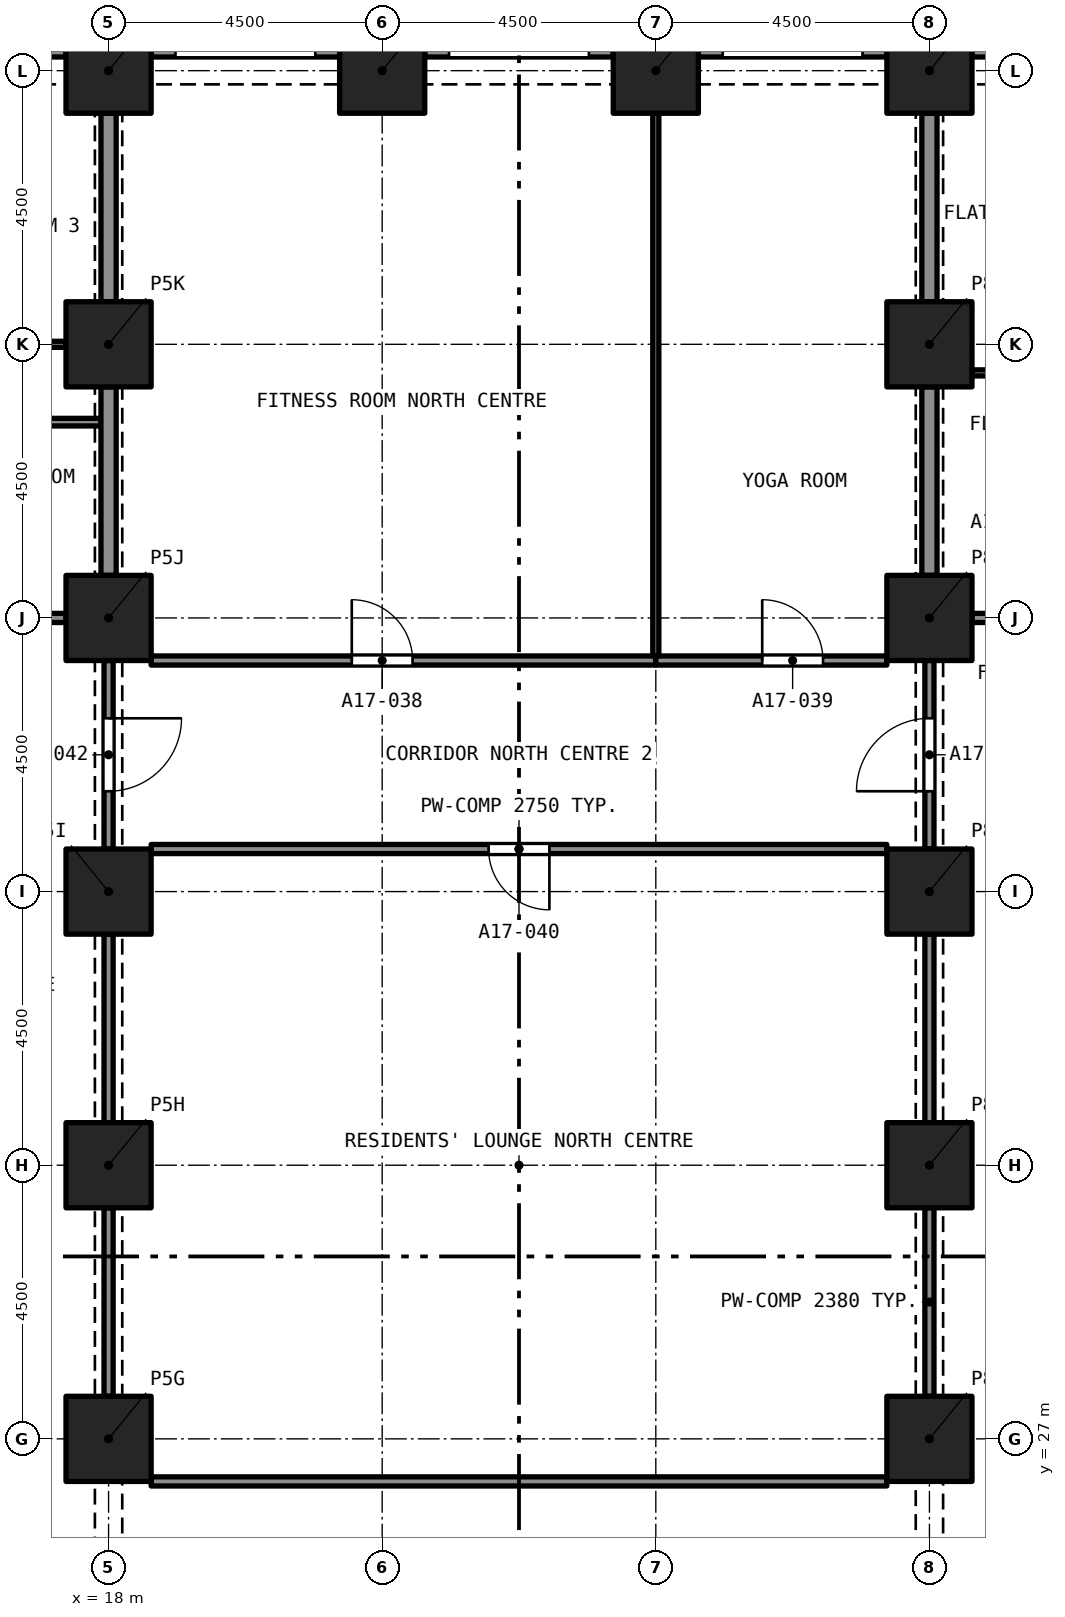
"""IFC4 building model, lengths in metres.
Left out: names, types, materials, properties, quantities, classifications, styles, units other than length and angle.
Written with IfcOpenShell. Run it as: python <this file> out.ifc"""

import sys

from ifc_helpers import new_model, si_unit, direction, frame, frame_2d, origin, origin_2d, place, context, subcontext, project, spatial, rectangle, extrude, element, fill, save


model = new_model("IFC4")
c1 = context("Model", 3, precision=1e-05, world=origin(), true_north=direction((0.0, 1.0)))
c2 = subcontext(c1, "Body", "Model", "MODEL_VIEW")
j1 = project(units=[si_unit("LENGTHUNIT", "METRE"), si_unit("PLANEANGLEUNIT", "RADIAN")], contexts=[c1])
p1 = place(None, origin())
s1 = spatial("IfcSite", under=j1, at=p1, CompositionType="ELEMENT")
p2 = place(p1, origin())
s2 = spatial("IfcBuilding", under=s1, at=p2, CompositionType="ELEMENT")
p3 = place(p2, frame((0.0, 0.0, 65.6)))
s3 = spatial("IfcBuildingStorey", under=s2, at=p3, CompositionType="ELEMENT", Elevation=65.6)
for number, where, z_axis, x_axis in (
    (1, (18.0, 27.0, 0.0), (0.0, 0.0, 1.0), (1.0, 0.0, 0.0)),
    (2, (31.5, 27.0, 0.0), (0.0, 0.0, 1.0), (1.0, 0.0, 0.0)),
    (3, (18.0, 31.5, 0.0), (0.0, 0.0, 1.0), (1.0, 0.0, 0.0)),
    (4, (31.5, 31.5, 0.0), (0.0, 0.0, 1.0), (1.0, 0.0, 0.0)),
    (5, (18.0, 36.0, 0.0), (0.0, 0.0, 1.0), (1.0, 0.0, 0.0)),
    (6, (31.5, 36.0, 0.0), (0.0, 0.0, 1.0), (1.0, 0.0, 0.0)),
    (7, (18.0, 40.5, 0.0), (0.0, 0.0, 1.0), (1.0, 0.0, 0.0)),
    (8, (31.5, 40.5, 0.0), (0.0, 0.0, 1.0), (1.0, 0.0, 0.0)),
    (9, (18.0, 45.0, 0.0), (0.0, 0.0, 1.0), (1.0, 0.0, 0.0)),
    (10, (31.5, 45.0, 0.0), (0.0, 0.0, 1.0), (1.0, 0.0, 0.0)),
    (11, (18.0, 49.5, 0.0), (0.0, 0.0, 1.0), (1.0, 0.0, 0.0)),
    (12, (22.5, 49.5, 0.0), (0.0, 0.0, 1.0), (1.0, 0.0, 0.0)),
    (13, (27.0, 49.5, 0.0), (0.0, 0.0, 1.0), (1.0, 0.0, 0.0)),
    (14, (31.5, 49.5, 0.0), (0.0, 0.0, 1.0), (1.0, 0.0, 0.0)),
):
    element("IfcColumn", number, at=place(p3, frame(where, z_axis=z_axis, x_axis=x_axis)), inside=s3, PredefinedType="COLUMN", context=c2, shape_type="SweptSolid", body=[
        extrude(rectangle(XDim=1.4, YDim=1.4, at=origin_2d()), origin(), (0.0, 0.0, 1.0), 3.2),
    ])
p4 = place(p3, frame((32.2, 49.875, 0.0), z_axis=(0.0, 0.0, 1.0), x_axis=(1.0, 0.0, 0.0)))
e15 = element("IfcWall", 15, at=p4, inside=s3, PredefinedType="SOLIDWALL", context=c2, shape_type="SweptSolid", body=[
    extrude(rectangle(XDim=3.1, YDim=0.3, at=frame_2d((1.55, 0.0))), origin(), (0.0, 0.0, 1.0), 3.2),
])
p5 = place(p4, frame((0.4, 0.0, 0.45)))
e16 = element("IfcOpeningElement", 16, at=p5, cuts=e15, PredefinedType="OPENING", context=c2, shape_type="SweptSolid", body=[
    extrude(rectangle(XDim=2.3, YDim=1.95, at=frame_2d((1.15, 0.975))), frame((0.0, 0.16, 0.0), z_axis=(0.0, -1.0, 0.0), x_axis=(1.0, 0.0, 0.0)), (0.0, 0.0, 1.0), 0.32),
])
p6 = place(p3, frame((27.7, 49.875, 0.0), z_axis=(0.0, 0.0, 1.0), x_axis=(1.0, 0.0, 0.0)))
e17 = element("IfcWall", 17, at=p6, inside=s3, PredefinedType="SOLIDWALL", context=c2, shape_type="SweptSolid", body=[
    extrude(rectangle(XDim=3.1, YDim=0.3, at=frame_2d((1.55, 0.0))), origin(), (0.0, 0.0, 1.0), 3.2),
])
p7 = place(p6, frame((0.4, 0.0, 0.45)))
e18 = element("IfcOpeningElement", 18, at=p7, cuts=e17, PredefinedType="OPENING", context=c2, shape_type="SweptSolid", body=[
    extrude(rectangle(XDim=2.3, YDim=1.95, at=frame_2d((1.15, 0.975))), frame((0.0, 0.16, 0.0), z_axis=(0.0, -1.0, 0.0), x_axis=(1.0, 0.0, 0.0)), (0.0, 0.0, 1.0), 0.32),
])
p8 = place(p3, frame((23.2, 49.875, 0.0), z_axis=(0.0, 0.0, 1.0), x_axis=(1.0, 0.0, 0.0)))
e19 = element("IfcWall", 19, at=p8, inside=s3, PredefinedType="SOLIDWALL", context=c2, shape_type="SweptSolid", body=[
    extrude(rectangle(XDim=3.1, YDim=0.3, at=frame_2d((1.55, 0.0))), origin(), (0.0, 0.0, 1.0), 3.2),
])
p9 = place(p8, frame((0.4, 0.0, 0.45)))
e20 = element("IfcOpeningElement", 20, at=p9, cuts=e19, PredefinedType="OPENING", context=c2, shape_type="SweptSolid", body=[
    extrude(rectangle(XDim=2.3, YDim=1.95, at=frame_2d((1.15, 0.975))), frame((0.0, 0.16, 0.0), z_axis=(0.0, -1.0, 0.0), x_axis=(1.0, 0.0, 0.0)), (0.0, 0.0, 1.0), 0.32),
])
p10 = place(p3, frame((18.7, 49.875, 0.0), z_axis=(0.0, 0.0, 1.0), x_axis=(1.0, 0.0, 0.0)))
e21 = element("IfcWall", 21, at=p10, inside=s3, PredefinedType="SOLIDWALL", context=c2, shape_type="SweptSolid", body=[
    extrude(rectangle(XDim=3.1, YDim=0.3, at=frame_2d((1.55, 0.0))), origin(), (0.0, 0.0, 1.0), 3.2),
])
p11 = place(p10, frame((0.4, 0.0, 0.45)))
e22 = element("IfcOpeningElement", 22, at=p11, cuts=e21, PredefinedType="OPENING", context=c2, shape_type="SweptSolid", body=[
    extrude(rectangle(XDim=2.3, YDim=1.95, at=frame_2d((1.15, 0.975))), frame((0.0, 0.16, 0.0), z_axis=(0.0, -1.0, 0.0), x_axis=(1.0, 0.0, 0.0)), (0.0, 0.0, 1.0), 0.32),
])
p12 = place(p3, frame((14.2, 49.875, 0.0), z_axis=(0.0, 0.0, 1.0), x_axis=(1.0, 0.0, 0.0)))
e23 = element("IfcWall", 23, at=p12, inside=s3, PredefinedType="SOLIDWALL", context=c2, shape_type="SweptSolid", body=[
    extrude(rectangle(XDim=3.1, YDim=0.3, at=frame_2d((1.55, 0.0))), origin(), (0.0, 0.0, 1.0), 3.2),
])
p13 = place(p12, frame((0.4, 0.0, 0.45)))
e24 = element("IfcOpeningElement", 24, at=p13, cuts=e23, PredefinedType="OPENING", context=c2, shape_type="SweptSolid", body=[
    extrude(rectangle(XDim=2.3, YDim=1.95, at=frame_2d((1.15, 0.975))), frame((0.0, 0.16, 0.0), z_axis=(0.0, -1.0, 0.0), x_axis=(1.0, 0.0, 0.0)), (0.0, 0.0, 1.0), 0.32),
])
p14 = place(p3, frame((17.875, 43.72, 0.0), z_axis=(0.0, 0.0, 1.0), x_axis=(-1.0, 0.0, 0.0)))
e25 = element("IfcWall", 25, at=p14, inside=s3, PredefinedType="PARTITIONING", context=c2, shape_type="SweptSolid", body=[
    extrude(rectangle(XDim=4.357, YDim=0.125, at=frame_2d((2.178, 0.0))), origin(), (0.0, 0.0, 1.0), 2.9),
])
p15 = place(p14, frame((1.716, 0.0, 0.0)))
e26 = element("IfcOpeningElement", 26, at=p15, cuts=e25, PredefinedType="OPENING", context=c2, shape_type="SweptSolid", body=[
    extrude(rectangle(XDim=0.8, YDim=2.1, at=frame_2d((0.4, 1.05))), frame((0.0, 0.073, 0.0), z_axis=(0.0, -1.0, 0.0), x_axis=(1.0, 0.0, 0.0)), (0.0, 0.0, 1.0), 0.145),
])
p16 = place(p3, frame((18.0, 41.2, 0.0), z_axis=(0.0, 0.0, 1.0), x_axis=(0.0, 1.0, 0.0)))
e27 = element("IfcWall", 27, at=p16, inside=s3, PredefinedType="PARTITIONING", context=c2, shape_type="SweptSolid", body=[
    extrude(rectangle(XDim=3.1, YDim=0.25, at=frame_2d((1.55, 0.0))), origin(), (0.0, 0.0, 1.0), 2.38),
])
p17 = place(p3, frame((13.456, 40.5, 0.0), z_axis=(0.0, 0.0, 1.0), x_axis=(1.0, 0.0, 0.0)))
e28 = element("IfcWall", 28, at=p17, inside=s3, PredefinedType="PARTITIONING", context=c2, shape_type="SweptSolid", body=[
    extrude(rectangle(XDim=3.844, YDim=0.15, at=frame_2d((1.922, 0.0))), origin(), (0.0, 0.0, 1.0), 2.9),
])
p18 = place(p3, frame((13.5, 45.0, 0.0), z_axis=(0.0, 0.0, 1.0), x_axis=(1.0, 0.0, 0.0)))
e29 = element("IfcWall", 29, at=p18, inside=s3, PredefinedType="PARTITIONING", context=c2, shape_type="SweptSolid", body=[
    extrude(rectangle(XDim=3.8, YDim=0.1, at=frame_2d((1.9, 0.0))), origin(), (0.0, 0.0, 1.0), 2.9),
])
p19 = place(p18, frame((1.8, 0.0, 0.0)))
e30 = element("IfcOpeningElement", 30, at=p19, cuts=e29, PredefinedType="OPENING", context=c2, shape_type="SweptSolid", body=[
    extrude(rectangle(XDim=0.9, YDim=2.1, at=frame_2d((0.45, 1.05))), frame((0.0, 0.06, 0.0), z_axis=(0.0, -1.0, 0.0), x_axis=(1.0, 0.0, 0.0)), (0.0, 0.0, 1.0), 0.12),
])
p20 = place(p3, frame((18.0, 45.7, 0.0), z_axis=(0.0, 0.0, 1.0), x_axis=(0.0, 1.0, 0.0)))
e31 = element("IfcWall", 31, at=p20, inside=s3, PredefinedType="PARTITIONING", context=c2, shape_type="SweptSolid", body=[
    extrude(rectangle(XDim=3.1, YDim=0.25, at=frame_2d((1.55, 0.0))), origin(), (0.0, 0.0, 1.0), 2.38),
])
p21 = place(p3, frame((32.2, 44.53, 0.0), z_axis=(0.0, 0.0, 1.0), x_axis=(1.0, 0.0, 0.0)))
e32 = element("IfcWall", 32, at=p21, inside=s3, PredefinedType="PARTITIONING", context=c2, shape_type="SweptSolid", body=[
    extrude(rectangle(XDim=3.8, YDim=0.1, at=frame_2d((1.9, 0.0))), origin(), (0.0, 0.0, 1.0), 2.9),
])
p22 = place(p21, frame((1.05, 0.0, 0.0)))
e33 = element("IfcOpeningElement", 33, at=p22, cuts=e32, PredefinedType="OPENING", context=c2, shape_type="SweptSolid", body=[
    extrude(rectangle(XDim=1.0, YDim=2.1, at=frame_2d((0.5, 1.05))), frame((0.0, 0.06, 0.0), z_axis=(0.0, -1.0, 0.0), x_axis=(1.0, 0.0, 0.0)), (0.0, 0.0, 1.0), 0.12),
])
p23 = place(p3, frame((31.5, 41.2, 0.0), z_axis=(0.0, 0.0, 1.0), x_axis=(0.0, 1.0, 0.0)))
e34 = element("IfcWall", 34, at=p23, inside=s3, PredefinedType="PARTITIONING", context=c2, shape_type="SweptSolid", body=[
    extrude(rectangle(XDim=3.1, YDim=0.25, at=frame_2d((1.55, 0.0))), origin(), (0.0, 0.0, 1.0), 2.38),
])
p24 = place(p3, frame((32.2, 40.5, 0.0), z_axis=(0.0, 0.0, 1.0), x_axis=(1.0, 0.0, 0.0)))
e35 = element("IfcWall", 35, at=p24, inside=s3, PredefinedType="PARTITIONING", context=c2, shape_type="SweptSolid", body=[
    extrude(rectangle(XDim=2.225, YDim=0.15, at=frame_2d((1.113, 0.0))), origin(), (0.0, 0.0, 1.0), 2.9),
])
p25 = place(p24, frame((1.05, 0.0, 0.0)))
e36 = element("IfcOpeningElement", 36, at=p25, cuts=e35, PredefinedType="OPENING", context=c2, shape_type="SweptSolid", body=[
    extrude(rectangle(XDim=1.0, YDim=2.1, at=frame_2d((0.5, 1.05))), frame((0.0, 0.085, 0.0), z_axis=(0.0, -1.0, 0.0), x_axis=(1.0, 0.0, 0.0)), (0.0, 0.0, 1.0), 0.17),
])
p26 = place(p3, frame((31.5, 45.7, 0.0), z_axis=(0.0, 0.0, 1.0), x_axis=(0.0, 1.0, 0.0)))
e37 = element("IfcWall", 37, at=p26, inside=s3, PredefinedType="PARTITIONING", context=c2, shape_type="SweptSolid", body=[
    extrude(rectangle(XDim=3.1, YDim=0.25, at=frame_2d((1.55, 0.0))), origin(), (0.0, 0.0, 1.0), 2.38),
])
p27 = place(p3, frame((18.7, 39.8, 0.0), z_axis=(0.0, 0.0, 1.0), x_axis=(1.0, 0.0, 0.0)))
e38 = element("IfcWall", 38, at=p27, inside=s3, PredefinedType="PARTITIONING", context=c2, shape_type="SweptSolid", body=[
    extrude(rectangle(XDim=8.3, YDim=0.15, at=frame_2d((4.15, 0.0))), origin(), (0.0, 0.0, 1.0), 2.75),
])
p28 = place(p27, frame((3.3, 0.0, 0.0)))
e39 = element("IfcOpeningElement", 39, at=p28, cuts=e38, PredefinedType="OPENING", context=c2, shape_type="SweptSolid", body=[
    extrude(rectangle(XDim=1.0, YDim=2.1, at=frame_2d((0.5, 1.05))), frame((0.0, 0.085, 0.0), z_axis=(0.0, -1.0, 0.0), x_axis=(1.0, 0.0, 0.0)), (0.0, 0.0, 1.0), 0.17),
])
p29 = place(p3, frame((27.0, 39.8, 0.0), z_axis=(0.0, 0.0, 1.0), x_axis=(1.0, 0.0, 0.0)))
e40 = element("IfcWall", 40, at=p29, inside=s3, PredefinedType="PARTITIONING", context=c2, shape_type="SweptSolid", body=[
    extrude(rectangle(XDim=3.8, YDim=0.15, at=frame_2d((1.9, 0.0))), origin(), (0.0, 0.0, 1.0), 2.75),
])
p30 = place(p29, frame((1.75, 0.0, 0.0)))
e41 = element("IfcOpeningElement", 41, at=p30, cuts=e40, PredefinedType="OPENING", context=c2, shape_type="SweptSolid", body=[
    extrude(rectangle(XDim=1.0, YDim=2.1, at=frame_2d((0.5, 1.05))), frame((0.0, 0.085, 0.0), z_axis=(0.0, -1.0, 0.0), x_axis=(1.0, 0.0, 0.0)), (0.0, 0.0, 1.0), 0.17),
])
p31 = place(p3, frame((30.8, 36.7, 0.0), z_axis=(0.0, 0.0, 1.0), x_axis=(-1.0, 0.0, 0.0)))
e42 = element("IfcWall", 42, at=p31, inside=s3, PredefinedType="PARTITIONING", context=c2, shape_type="SweptSolid", body=[
    extrude(rectangle(XDim=12.1, YDim=0.15, at=frame_2d((6.05, 0.0))), origin(), (0.0, 0.0, 1.0), 2.75),
])
p32 = place(p31, frame((5.55, 0.0, 0.0)))
e43 = element("IfcOpeningElement", 43, at=p32, cuts=e42, PredefinedType="OPENING", context=c2, shape_type="SweptSolid", body=[
    extrude(rectangle(XDim=1.0, YDim=2.1, at=frame_2d((0.5, 1.05))), frame((0.0, 0.085, 0.0), z_axis=(0.0, -1.0, 0.0), x_axis=(1.0, 0.0, 0.0)), (0.0, 0.0, 1.0), 0.17),
])
p33 = place(p3, frame((31.5, 36.7, 0.0), z_axis=(0.0, 0.0, 1.0), x_axis=(0.0, 1.0, 0.0)))
e44 = element("IfcWall", 44, at=p33, inside=s3, PredefinedType="PARTITIONING", context=c2, shape_type="SweptSolid", body=[
    extrude(rectangle(XDim=3.1, YDim=0.15, at=frame_2d((1.55, 0.0))), origin(), (0.0, 0.0, 1.0), 2.38),
])
p34 = place(p33, frame((0.95, 0.0, 0.0)))
e45 = element("IfcOpeningElement", 45, at=p34, cuts=e44, PredefinedType="OPENING", context=c2, shape_type="SweptSolid", body=[
    extrude(rectangle(XDim=1.2, YDim=2.1, at=frame_2d((0.6, 1.05))), frame((0.0, 0.085, 0.0), z_axis=(0.0, -1.0, 0.0), x_axis=(1.0, 0.0, 0.0)), (0.0, 0.0, 1.0), 0.17),
])
p35 = place(p3, frame((18.0, 39.8, 0.0), z_axis=(0.0, 0.0, 1.0), x_axis=(0.0, -1.0, 0.0)))
e46 = element("IfcWall", 46, at=p35, inside=s3, PredefinedType="PARTITIONING", context=c2, shape_type="SweptSolid", body=[
    extrude(rectangle(XDim=3.1, YDim=0.15, at=frame_2d((1.55, 0.0))), origin(), (0.0, 0.0, 1.0), 2.38),
])
p36 = place(p35, frame((0.95, 0.0, 0.0)))
e47 = element("IfcOpeningElement", 47, at=p36, cuts=e46, PredefinedType="OPENING", context=c2, shape_type="SweptSolid", body=[
    extrude(rectangle(XDim=1.2, YDim=2.1, at=frame_2d((0.6, 1.05))), frame((0.0, 0.085, 0.0), z_axis=(0.0, -1.0, 0.0), x_axis=(1.0, 0.0, 0.0)), (0.0, 0.0, 1.0), 0.17),
])
p37 = place(p3, frame((27.0, 39.875, 0.0), z_axis=(0.0, 0.0, 1.0), x_axis=(0.0, 1.0, 0.0)))
e48 = element("IfcWall", 48, at=p37, inside=s3, PredefinedType="PARTITIONING", context=c2, shape_type="SweptSolid", body=[
    extrude(rectangle(XDim=8.925, YDim=0.1, at=frame_2d((4.462, 0.0))), origin(), (0.0, 0.0, 1.0), 2.75),
])
for number, where, z_axis, x_axis in (
    (49, (31.5, 32.2, 0.0), (0.0, 0.0, 1.0), (0.0, 1.0, 0.0)),
    (50, (31.5, 27.7, 0.0), (0.0, 0.0, 1.0), (0.0, 1.0, 0.0)),
    (51, (18.0, 27.7, 0.0), (0.0, 0.0, 1.0), (0.0, 1.0, 0.0)),
    (52, (18.0, 32.2, 0.0), (0.0, 0.0, 1.0), (0.0, 1.0, 0.0)),
):
    element("IfcWall", number, at=place(p3, frame(where, z_axis=z_axis, x_axis=x_axis)), inside=s3, PredefinedType="PARTITIONING", context=c2, shape_type="SweptSolid", body=[
        extrude(rectangle(XDim=3.1, YDim=0.15, at=frame_2d((1.55, 0.0))), origin(), (0.0, 0.0, 1.0), 2.38),
    ])
p38 = place(p3, frame((18.7, 26.3, 0.0), z_axis=(0.0, 0.0, 1.0), x_axis=(1.0, 0.0, 0.0)))
e53 = element("IfcWall", 53, at=p38, inside=s3, PredefinedType="PARTITIONING", context=c2, shape_type="SweptSolid", body=[
    extrude(rectangle(XDim=12.1, YDim=0.15, at=frame_2d((6.05, 0.0))), origin(), (0.0, 0.0, 1.0), 2.75),
])
p39 = place(p28, origin())
e54 = element("IfcDoor", 54, at=p39, inside=s3, OperationType="SINGLE_SWING_LEFT", PredefinedType="DOOR", context=c2, shape_type="SweptSolid", body=[
    extrude(rectangle(XDim=1.0, YDim=2.1, at=frame_2d((0.5, 1.05))), frame((0.0, 0.025, 0.0), z_axis=(0.0, -1.0, 0.0), x_axis=(1.0, 0.0, 0.0)), (0.0, 0.0, 1.0), 0.05),
])
fill(e39, e54)
p40 = place(p30, origin())
e55 = element("IfcDoor", 55, at=p40, inside=s3, OperationType="SINGLE_SWING_RIGHT", PredefinedType="DOOR", context=c2, shape_type="SweptSolid", body=[
    extrude(rectangle(XDim=1.0, YDim=2.1, at=frame_2d((0.5, 1.05))), frame((0.0, 0.025, 0.0), z_axis=(0.0, -1.0, 0.0), x_axis=(1.0, 0.0, 0.0)), (0.0, 0.0, 1.0), 0.05),
])
fill(e41, e55)
p41 = place(p32, origin())
e56 = element("IfcDoor", 56, at=p41, inside=s3, OperationType="SINGLE_SWING_RIGHT", PredefinedType="DOOR", context=c2, shape_type="SweptSolid", body=[
    extrude(rectangle(XDim=1.0, YDim=2.1, at=frame_2d((0.5, 1.05))), frame((0.0, 0.025, 0.0), z_axis=(0.0, -1.0, 0.0), x_axis=(1.0, 0.0, 0.0)), (0.0, 0.0, 1.0), 0.05),
])
fill(e43, e56)
p42 = place(p34, origin())
e57 = element("IfcDoor", 57, at=p42, inside=s3, OperationType="SINGLE_SWING_LEFT", PredefinedType="DOOR", context=c2, shape_type="SweptSolid", body=[
    extrude(rectangle(XDim=1.2, YDim=2.1, at=frame_2d((0.6, 1.05))), frame((0.0, 0.025, 0.0), z_axis=(0.0, -1.0, 0.0), x_axis=(1.0, 0.0, 0.0)), (0.0, 0.0, 1.0), 0.05),
])
fill(e45, e57)
p43 = place(p36, origin())
e58 = element("IfcDoor", 58, at=p43, inside=s3, OperationType="SINGLE_SWING_LEFT", PredefinedType="DOOR", context=c2, shape_type="SweptSolid", body=[
    extrude(rectangle(XDim=1.2, YDim=2.1, at=frame_2d((0.6, 1.05))), frame((0.0, 0.025, 0.0), z_axis=(0.0, -1.0, 0.0), x_axis=(1.0, 0.0, 0.0)), (0.0, 0.0, 1.0), 0.05),
])
fill(e47, e58)
save(model, sys.argv[1])
